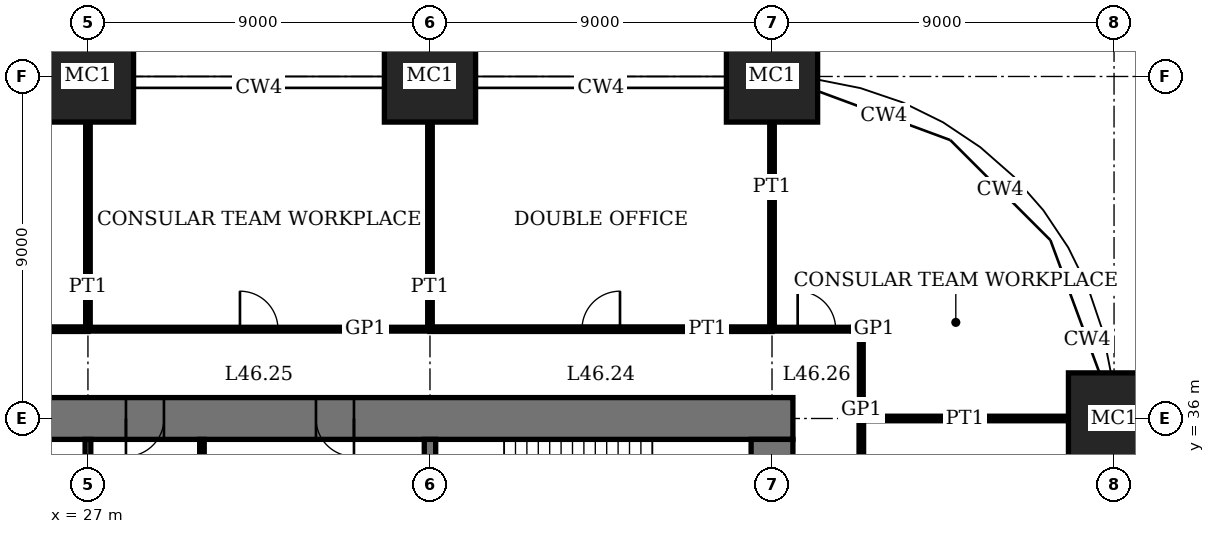
"""IFC4 building model, lengths in metres.
Left out: names, types, materials, properties, quantities, classifications, styles, units other than length and angle.
Written with IfcOpenShell. Run it as: python <this file> out.ifc"""

import sys

from ifc_helpers import new_model, si_unit, direction, frame, frame_2d, origin, origin_2d, place, context, subcontext, project, spatial, rectangle, extrude, element, fill, save


model = new_model("IFC4")
c1 = context("Model", 3, precision=1e-05, world=origin(), true_north=direction((0.0, 1.0)))
c2 = subcontext(c1, "Body", "Model", "MODEL_VIEW")
j1 = project(units=[si_unit("LENGTHUNIT", "METRE"), si_unit("PLANEANGLEUNIT", "RADIAN")], contexts=[c1])
p1 = place(None, origin())
s1 = spatial("IfcSite", under=j1, at=p1, CompositionType="ELEMENT")
p2 = place(p1, origin())
s2 = spatial("IfcBuilding", under=s1, at=p2, CompositionType="ELEMENT")
p3 = place(p2, frame((0.0, 0.0, 190.2)))
s3 = spatial("IfcBuildingStorey", under=s2, at=p3, CompositionType="ELEMENT", Elevation=190.2)
for number, where, z_axis, x_axis in (
    (1, (27.0, 45.0, 0.0), (0.0, 0.0, 1.0), (1.0, 0.0, 0.0)),
    (2, (36.0, 45.0, 0.0), (0.0, 0.0, 1.0), (1.0, 0.0, 0.0)),
    (3, (45.0, 45.0, 0.0), (0.0, 0.0, 1.0), (1.0, 0.0, 0.0)),
    (4, (54.0, 36.0, 0.0), (0.0, 0.0, 1.0), (1.0, 0.0, 0.0)),
):
    element("IfcColumn", number, at=place(p3, frame(where, z_axis=z_axis, x_axis=x_axis)), inside=s3, PredefinedType="COLUMN", context=c2, shape_type="SweptSolid", body=[
        extrude(rectangle(XDim=2.4, YDim=2.4, at=origin_2d()), origin(), (0.0, 0.0, 1.0), 4.0),
    ])
p4 = place(p3, frame((45.55, 36.0, 0.0), z_axis=(0.0, 0.0, 1.0), x_axis=(-1.0, 0.0, 0.0)))
e5 = element("IfcWall", 5, at=p4, inside=s3, PredefinedType="SHEAR", context=c2, shape_type="SweptSolid", body=[
    extrude(rectangle(XDim=28.1, YDim=1.1, at=frame_2d((14.05, 0.0))), origin(), (0.0, 0.0, 1.0), 4.0),
])
p5 = place(p4, frame((11.55, 0.0, 0.0)))
e6 = element("IfcOpeningElement", 6, at=p5, cuts=e5, PredefinedType="OPENING", context=c2, shape_type="SweptSolid", body=[
    extrude(rectangle(XDim=1.0, YDim=2.4, at=frame_2d((0.5, 1.2))), frame((0.0, 0.56, 0.0), z_axis=(0.0, -1.0, 0.0), x_axis=(1.0, 0.0, 0.0)), (0.0, 0.0, 1.0), 1.12),
])
p6 = place(p4, frame((16.55, 0.0, 0.0)))
e7 = element("IfcOpeningElement", 7, at=p6, cuts=e5, PredefinedType="OPENING", context=c2, shape_type="SweptSolid", body=[
    extrude(rectangle(XDim=1.0, YDim=2.4, at=frame_2d((0.5, 1.2))), frame((0.0, 0.56, 0.0), z_axis=(0.0, -1.0, 0.0), x_axis=(1.0, 0.0, 0.0)), (0.0, 0.0, 1.0), 1.12),
])
p7 = place(p4, frame((20.0, 0.0, 0.0)))
e8 = element("IfcOpeningElement", 8, at=p7, cuts=e5, PredefinedType="OPENING", context=c2, shape_type="SweptSolid", body=[
    extrude(rectangle(XDim=1.1, YDim=2.4, at=frame_2d((0.55, 1.2))), frame((0.0, 0.56, 0.0), z_axis=(0.0, -1.0, 0.0), x_axis=(1.0, 0.0, 0.0)), (0.0, 0.0, 1.0), 1.12),
])
p8 = place(p4, frame((24.05, 0.0, 0.0)))
e9 = element("IfcOpeningElement", 9, at=p8, cuts=e5, PredefinedType="OPENING", context=c2, shape_type="SweptSolid", body=[
    extrude(rectangle(XDim=1.0, YDim=2.4, at=frame_2d((0.5, 1.2))), frame((0.0, 0.56, 0.0), z_axis=(0.0, -1.0, 0.0), x_axis=(1.0, 0.0, 0.0)), (0.0, 0.0, 1.0), 1.12),
])
p9 = place(p3, frame((45.0, 18.55, 0.0), z_axis=(0.0, 0.0, 1.0), x_axis=(0.0, 1.0, 0.0)))
e10 = element("IfcWall", 10, at=p9, inside=s3, PredefinedType="SHEAR", context=c2, shape_type="SweptSolid", body=[
    extrude(rectangle(XDim=16.9, YDim=1.1, at=frame_2d((8.45, 0.0))), origin(), (0.0, 0.0, 1.0), 4.0),
])
p10 = place(p9, frame((8.45, 0.0, 0.0)))
e11 = element("IfcOpeningElement", 11, at=p10, cuts=e10, PredefinedType="OPENING", context=c2, shape_type="SweptSolid", body=[
    extrude(rectangle(XDim=1.8, YDim=2.4, at=frame_2d((0.9, 1.2))), frame((0.0, 0.56, 0.0), z_axis=(0.0, -1.0, 0.0), x_axis=(1.0, 0.0, 0.0)), (0.0, 0.0, 1.0), 1.12),
])
p11 = place(p3, frame((36.0, 32.4, 0.0), z_axis=(0.0, 0.0, 1.0), x_axis=(0.0, 1.0, 0.0)))
e12 = element("IfcWall", 12, at=p11, inside=s3, PredefinedType="SHEAR", context=c2, shape_type="SweptSolid", body=[
    extrude(rectangle(XDim=3.05, YDim=0.3, at=frame_2d((1.525, 0.0))), origin(), (0.0, 0.0, 1.0), 4.0),
])
p12 = place(p3, frame((47.35, 36.0, 0.0), z_axis=(0.0, 0.0, 1.0), x_axis=(1.0, 0.0, 0.0)))
e13 = element("IfcWall", 13, at=p12, inside=s3, PredefinedType="PARTITIONING", context=c2, shape_type="SweptSolid", body=[
    extrude(rectangle(XDim=5.45, YDim=0.12, at=frame_2d((2.725, 0.0))), origin(), (0.0, 0.0, 1.0), 3.05),
])
p13 = place(p3, frame((18.0, 38.35, 0.0), z_axis=(0.0, 0.0, 1.0), x_axis=(1.0, 0.0, 0.0)))
e14 = element("IfcWall", 14, at=p13, inside=s3, PredefinedType="PARTITIONING", context=c2, shape_type="SweptSolid", body=[
    extrude(rectangle(XDim=9.0, YDim=0.12, at=frame_2d((4.5, 0.0))), origin(), (0.0, 0.0, 1.0), 3.75),
])
p14 = place(p13, frame((4.0, 0.0, 0.0)))
e15 = element("IfcOpeningElement", 15, at=p14, cuts=e14, PredefinedType="OPENING", context=c2, shape_type="SweptSolid", body=[
    extrude(rectangle(XDim=1.0, YDim=2.4, at=frame_2d((0.5, 1.2))), frame((0.0, 0.07, 0.0), z_axis=(0.0, -1.0, 0.0), x_axis=(1.0, 0.0, 0.0)), (0.0, 0.0, 1.0), 0.14),
])
p15 = place(p3, frame((36.0, 38.35, 0.0), z_axis=(0.0, 0.0, 1.0), x_axis=(1.0, 0.0, 0.0)))
e16 = element("IfcWall", 16, at=p15, inside=s3, PredefinedType="PARTITIONING", context=c2, shape_type="SweptSolid", body=[
    extrude(rectangle(XDim=9.0, YDim=0.12, at=frame_2d((4.5, 0.0))), origin(), (0.0, 0.0, 1.0), 3.75),
])
p16 = place(p15, frame((4.0, 0.0, 0.0)))
e17 = element("IfcOpeningElement", 17, at=p16, cuts=e16, PredefinedType="OPENING", context=c2, shape_type="SweptSolid", body=[
    extrude(rectangle(XDim=1.0, YDim=2.4, at=frame_2d((0.5, 1.2))), frame((0.0, 0.07, 0.0), z_axis=(0.0, -1.0, 0.0), x_axis=(1.0, 0.0, 0.0)), (0.0, 0.0, 1.0), 0.14),
])
p17 = place(p3, frame((27.0, 38.35, 0.0), z_axis=(0.0, 0.0, 1.0), x_axis=(1.0, 0.0, 0.0)))
e18 = element("IfcWall", 18, at=p17, inside=s3, PredefinedType="PARTITIONING", context=c2, shape_type="SweptSolid", body=[
    extrude(rectangle(XDim=9.0, YDim=0.1, at=frame_2d((4.5, 0.0))), origin(), (0.0, 0.0, 1.0), 3.75),
])
p18 = place(p17, frame((4.0, 0.0, 0.0)))
e19 = element("IfcOpeningElement", 19, at=p18, cuts=e18, PredefinedType="OPENING", context=c2, shape_type="SweptSolid", body=[
    extrude(rectangle(XDim=1.0, YDim=2.4, at=frame_2d((0.5, 1.2))), frame((0.0, 0.06, 0.0), z_axis=(0.0, -1.0, 0.0), x_axis=(1.0, 0.0, 0.0)), (0.0, 0.0, 1.0), 0.12),
])
p19 = place(p3, frame((45.0, 38.35, 0.0), z_axis=(0.0, 0.0, 1.0), x_axis=(1.0, 0.0, 0.0)))
e20 = element("IfcWall", 20, at=p19, inside=s3, PredefinedType="PARTITIONING", context=c2, shape_type="SweptSolid", body=[
    extrude(rectangle(XDim=2.35, YDim=0.1, at=frame_2d((1.175, 0.0))), origin(), (0.0, 0.0, 1.0), 3.75),
])
p20 = place(p19, frame((0.675, 0.0, 0.0)))
e21 = element("IfcOpeningElement", 21, at=p20, cuts=e20, PredefinedType="OPENING", context=c2, shape_type="SweptSolid", body=[
    extrude(rectangle(XDim=1.0, YDim=2.4, at=frame_2d((0.5, 1.2))), frame((0.0, 0.06, 0.0), z_axis=(0.0, -1.0, 0.0), x_axis=(1.0, 0.0, 0.0)), (0.0, 0.0, 1.0), 0.12),
])
for number, where, z_axis, x_axis in (
    (22, (27.0, 38.35, 0.0), (0.0, 0.0, 1.0), (0.0, 1.0, 0.0)),
    (23, (36.0, 38.35, 0.0), (0.0, 0.0, 1.0), (0.0, 1.0, 0.0)),
    (24, (45.0, 38.35, 0.0), (0.0, 0.0, 1.0), (0.0, 1.0, 0.0)),
):
    element("IfcWall", number, at=place(p3, frame(where, z_axis=z_axis, x_axis=x_axis)), inside=s3, PredefinedType="PARTITIONING", context=c2, shape_type="SweptSolid", body=[
        extrude(rectangle(XDim=5.45, YDim=0.12, at=frame_2d((2.725, 0.0))), origin(), (0.0, 0.0, 1.0), 3.05),
    ])
p21 = place(p3, frame((47.35, 27.0, 0.0), z_axis=(0.0, 0.0, 1.0), x_axis=(0.0, 1.0, 0.0)))
e25 = element("IfcWall", 25, at=p21, inside=s3, PredefinedType="PARTITIONING", context=c2, shape_type="SweptSolid", body=[
    extrude(rectangle(XDim=9.0, YDim=0.12, at=frame_2d((4.5, 0.0))), origin(), (0.0, 0.0, 1.0), 3.75),
])
p22 = place(p21, frame((4.0, 0.0, 0.0)))
e26 = element("IfcOpeningElement", 26, at=p22, cuts=e25, PredefinedType="OPENING", context=c2, shape_type="SweptSolid", body=[
    extrude(rectangle(XDim=1.0, YDim=2.4, at=frame_2d((0.5, 1.2))), frame((0.0, 0.07, 0.0), z_axis=(0.0, -1.0, 0.0), x_axis=(1.0, 0.0, 0.0)), (0.0, 0.0, 1.0), 0.14),
])
p23 = place(p3, frame((47.35, 36.0, 0.0), z_axis=(0.0, 0.0, 1.0), x_axis=(0.0, 1.0, 0.0)))
e27 = element("IfcWall", 27, at=p23, inside=s3, PredefinedType="PARTITIONING", context=c2, shape_type="SweptSolid", body=[
    extrude(rectangle(XDim=2.35, YDim=0.1, at=frame_2d((1.175, 0.0))), origin(), (0.0, 0.0, 1.0), 3.75),
])
p24 = place(p3, frame((30.0, 32.55, 0.0), z_axis=(0.0, 0.0, 1.0), x_axis=(0.0, 1.0, 0.0)))
e28 = element("IfcWall", 28, at=p24, inside=s3, PredefinedType="PARTITIONING", context=c2, shape_type="SweptSolid", body=[
    extrude(rectangle(XDim=2.9, YDim=0.12, at=frame_2d((1.45, 0.0))), origin(), (0.0, 0.0, 1.0), 3.75),
])
p25 = place(p3, frame((27.0, 32.55, 0.0), z_axis=(0.0, 0.0, 1.0), x_axis=(0.0, 1.0, 0.0)))
e29 = element("IfcWall", 29, at=p25, inside=s3, PredefinedType="PARTITIONING", context=c2, shape_type="SweptSolid", body=[
    extrude(rectangle(XDim=2.9, YDim=0.15, at=frame_2d((1.45, 0.0))), origin(), (0.0, 0.0, 1.0), 3.75),
])
p26 = place(p5, origin())
e30 = element("IfcDoor", 30, at=p26, inside=s3, OperationType="SINGLE_SWING_RIGHT", PredefinedType="DOOR", context=c2, shape_type="SweptSolid", body=[
    extrude(rectangle(XDim=1.0, YDim=2.4, at=frame_2d((0.5, 1.2))), frame((0.0, 0.025, 0.0), z_axis=(0.0, -1.0, 0.0), x_axis=(1.0, 0.0, 0.0)), (0.0, 0.0, 1.0), 0.05),
    extrude(rectangle(XDim=0.04, YDim=2.4, at=frame_2d((0.02, 1.2))), frame((0.0, 0.4, 0.0), z_axis=(0.0, -1.0, 0.0), x_axis=(1.0, 0.0, 0.0)), (0.0, 0.0, 1.0), 0.8),
    extrude(rectangle(XDim=0.04, YDim=2.4, at=frame_2d((0.98, 1.2))), frame((0.0, 0.4, 0.0), z_axis=(0.0, -1.0, 0.0), x_axis=(1.0, 0.0, 0.0)), (0.0, 0.0, 1.0), 0.8),
    extrude(rectangle(XDim=1.0, YDim=0.04, at=frame_2d((0.5, 2.38))), frame((0.0, 0.4, 0.0), z_axis=(0.0, -1.0, 0.0), x_axis=(1.0, 0.0, 0.0)), (0.0, 0.0, 1.0), 0.8),
])
fill(e6, e30)
p27 = place(p6, origin())
e31 = element("IfcDoor", 31, at=p27, inside=s3, OperationType="SINGLE_SWING_LEFT", PredefinedType="DOOR", context=c2, shape_type="SweptSolid", body=[
    extrude(rectangle(XDim=1.0, YDim=2.4, at=frame_2d((0.5, 1.2))), frame((0.0, 0.025, 0.0), z_axis=(0.0, -1.0, 0.0), x_axis=(1.0, 0.0, 0.0)), (0.0, 0.0, 1.0), 0.05),
    extrude(rectangle(XDim=0.04, YDim=2.4, at=frame_2d((0.02, 1.2))), frame((0.0, 0.4, 0.0), z_axis=(0.0, -1.0, 0.0), x_axis=(1.0, 0.0, 0.0)), (0.0, 0.0, 1.0), 0.8),
    extrude(rectangle(XDim=0.04, YDim=2.4, at=frame_2d((0.98, 1.2))), frame((0.0, 0.4, 0.0), z_axis=(0.0, -1.0, 0.0), x_axis=(1.0, 0.0, 0.0)), (0.0, 0.0, 1.0), 0.8),
    extrude(rectangle(XDim=1.0, YDim=0.04, at=frame_2d((0.5, 2.38))), frame((0.0, 0.4, 0.0), z_axis=(0.0, -1.0, 0.0), x_axis=(1.0, 0.0, 0.0)), (0.0, 0.0, 1.0), 0.8),
])
fill(e7, e31)
p28 = place(p16, origin())
e32 = element("IfcDoor", 32, at=p28, inside=s3, OperationType="SINGLE_SWING_LEFT", PredefinedType="DOOR", context=c2, shape_type="SweptSolid", body=[
    extrude(rectangle(XDim=1.0, YDim=2.4, at=frame_2d((0.5, 1.2))), frame((0.0, 0.025, 0.0), z_axis=(0.0, -1.0, 0.0), x_axis=(1.0, 0.0, 0.0)), (0.0, 0.0, 1.0), 0.05),
])
fill(e17, e32)
p29 = place(p18, origin())
e33 = element("IfcDoor", 33, at=p29, inside=s3, OperationType="SINGLE_SWING_RIGHT", PredefinedType="DOOR", context=c2, shape_type="SweptSolid", body=[
    extrude(rectangle(XDim=1.0, YDim=2.4, at=frame_2d((0.5, 1.2))), frame((0.0, 0.02, 0.0), z_axis=(0.0, -1.0, 0.0), x_axis=(1.0, 0.0, 0.0)), (0.0, 0.0, 1.0), 0.04),
])
fill(e19, e33)
p30 = place(p20, origin())
e34 = element("IfcDoor", 34, at=p30, inside=s3, OperationType="SINGLE_SWING_RIGHT", PredefinedType="DOOR", context=c2, shape_type="SweptSolid", body=[
    extrude(rectangle(XDim=1.0, YDim=2.4, at=frame_2d((0.5, 1.2))), frame((0.0, 0.02, 0.0), z_axis=(0.0, -1.0, 0.0), x_axis=(1.0, 0.0, 0.0)), (0.0, 0.0, 1.0), 0.04),
])
fill(e21, e34)
save(model, sys.argv[1])
